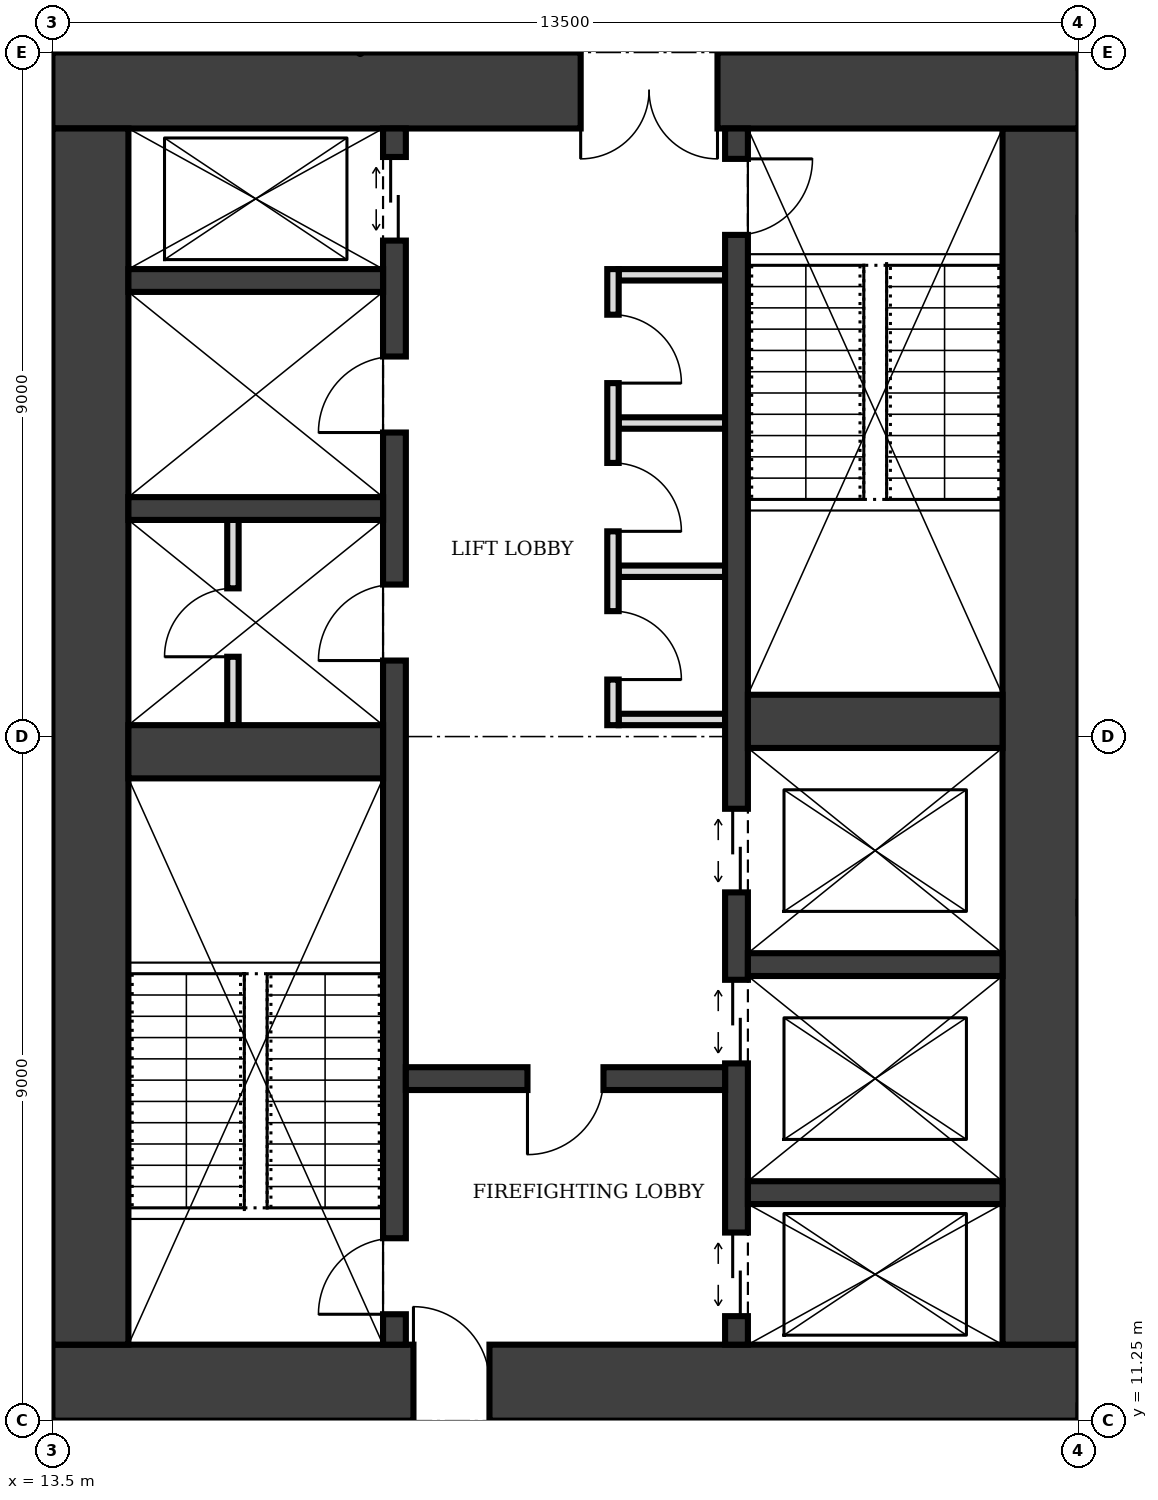
"""IFC4 building model, lengths in metres.
Left out: names, types, materials, properties, quantities, classifications, styles, units other than length and angle.
Written with IfcOpenShell. Run it as: python <this file> out.ifc"""

import sys

from ifc_helpers import new_model, si_unit, direction, frame, frame_2d, origin, place, context, subcontext, project, spatial, rectangle, extrude, element, fill, save


model = new_model("IFC4")
c1 = context("Model", 3, precision=1e-05, world=origin(), true_north=direction((0.0, 1.0)))
c2 = subcontext(c1, "Body", "Model", "MODEL_VIEW")
j1 = project(units=[si_unit("LENGTHUNIT", "METRE"), si_unit("PLANEANGLEUNIT", "RADIAN")], contexts=[c1])
p1 = place(None, origin())
s1 = spatial("IfcSite", under=j1, at=p1, CompositionType="ELEMENT")
p2 = place(p1, origin())
s2 = spatial("IfcBuilding", under=s1, at=p2, CompositionType="ELEMENT")
p3 = place(p2, frame((0.0, 0.0, 141.0)))
s3 = spatial("IfcBuildingStorey", under=s2, at=p3, CompositionType="ELEMENT", Elevation=141.0)
p4 = place(p3, frame((13.5, 11.75, 0.0), z_axis=(0.0, 0.0, 1.0), x_axis=(1.0, 0.0, 0.0)))
e1 = element("IfcWall", 1, at=p4, inside=s3, PredefinedType="SHEAR", context=c2, shape_type="SweptSolid", body=[
    extrude(rectangle(XDim=13.5, YDim=1.0, at=frame_2d((6.75, 0.0))), origin(), (0.0, 0.0, 1.0), 4.0),
])
p5 = place(p4, frame((4.75, 0.0, 0.0)))
e2 = element("IfcOpeningElement", 2, at=p5, cuts=e1, PredefinedType="OPENING", context=c2, shape_type="SweptSolid", body=[
    extrude(rectangle(XDim=1.0, YDim=2.1, at=frame_2d((0.5, 1.05))), frame((0.0, 0.51, 0.0), z_axis=(0.0, -1.0, 0.0), x_axis=(1.0, 0.0, 0.0)), (0.0, 0.0, 1.0), 1.02),
])
p6 = place(p3, frame((26.5, 12.25, 0.0), z_axis=(0.0, 0.0, 1.0), x_axis=(0.0, 1.0, 0.0)))
e3 = element("IfcWall", 3, at=p6, inside=s3, PredefinedType="SHEAR", context=c2, shape_type="SweptSolid", body=[
    extrude(rectangle(XDim=16.0, YDim=1.0, at=frame_2d((8.0, 0.0))), origin(), (0.0, 0.0, 1.0), 4.0),
])
p7 = place(p3, frame((27.0, 28.75, 0.0), z_axis=(0.0, 0.0, 1.0), x_axis=(-1.0, 0.0, 0.0)))
e4 = element("IfcWall", 4, at=p7, inside=s3, PredefinedType="SHEAR", context=c2, shape_type="SweptSolid", body=[
    extrude(rectangle(XDim=13.5, YDim=1.0, at=frame_2d((6.75, 0.0))), origin(), (0.0, 0.0, 1.0), 4.0),
])
p8 = place(p7, frame((4.75, 0.0, 0.0)))
e5 = element("IfcOpeningElement", 5, at=p8, cuts=e4, PredefinedType="OPENING", context=c2, shape_type="SweptSolid", body=[
    extrude(rectangle(XDim=1.8, YDim=2.1, at=frame_2d((0.9, 1.05))), frame((0.0, 0.51, 0.0), z_axis=(0.0, -1.0, 0.0), x_axis=(1.0, 0.0, 0.0)), (0.0, 0.0, 1.0), 1.02),
])
p9 = place(p3, frame((14.0, 28.25, 0.0), z_axis=(0.0, 0.0, 1.0), x_axis=(0.0, -1.0, 0.0)))
e6 = element("IfcWall", 6, at=p9, inside=s3, PredefinedType="SHEAR", context=c2, shape_type="SweptSolid", body=[
    extrude(rectangle(XDim=16.0, YDim=1.0, at=frame_2d((8.0, 0.0))), origin(), (0.0, 0.0, 1.0), 4.0),
])
p10 = place(p3, frame((18.0, 12.25, 0.0), z_axis=(0.0, 0.0, 1.0), x_axis=(0.0, 1.0, 0.0)))
e7 = element("IfcWall", 7, at=p10, inside=s3, PredefinedType="SHEAR", context=c2, shape_type="SweptSolid", body=[
    extrude(rectangle(XDim=16.0, YDim=0.3, at=frame_2d((8.0, 0.0))), origin(), (0.0, 0.0, 1.0), 4.0),
])
p11 = place(p10, frame((0.4, 0.0, 0.0)))
e8 = element("IfcOpeningElement", 8, at=p11, cuts=e7, PredefinedType="OPENING", context=c2, shape_type="SweptSolid", body=[
    extrude(rectangle(XDim=1.0, YDim=2.1, at=frame_2d((0.5, 1.05))), frame((0.0, 0.16, 0.0), z_axis=(0.0, -1.0, 0.0), x_axis=(1.0, 0.0, 0.0)), (0.0, 0.0, 1.0), 0.32),
])
p12 = place(p10, frame((14.525, 0.0, 0.0)))
e9 = element("IfcOpeningElement", 9, at=p12, cuts=e7, PredefinedType="OPENING", context=c2, shape_type="SweptSolid", body=[
    extrude(rectangle(XDim=1.1, YDim=2.1, at=frame_2d((0.55, 1.05))), frame((0.0, 0.16, 0.0), z_axis=(0.0, -1.0, 0.0), x_axis=(1.0, 0.0, 0.0)), (0.0, 0.0, 1.0), 0.32),
])
p13 = place(p10, frame((9.0, 0.0, 0.0)))
e10 = element("IfcOpeningElement", 10, at=p13, cuts=e7, PredefinedType="OPENING", context=c2, shape_type="SweptSolid", body=[
    extrude(rectangle(XDim=1.0, YDim=2.1, at=frame_2d((0.5, 1.05))), frame((0.0, 0.16, 0.0), z_axis=(0.0, -1.0, 0.0), x_axis=(1.0, 0.0, 0.0)), (0.0, 0.0, 1.0), 0.32),
])
p14 = place(p10, frame((12.0, 0.0, 0.0)))
e11 = element("IfcOpeningElement", 11, at=p14, cuts=e7, PredefinedType="OPENING", context=c2, shape_type="SweptSolid", body=[
    extrude(rectangle(XDim=1.0, YDim=2.1, at=frame_2d((0.5, 1.05))), frame((0.0, 0.16, 0.0), z_axis=(0.0, -1.0, 0.0), x_axis=(1.0, 0.0, 0.0)), (0.0, 0.0, 1.0), 0.32),
])
p15 = place(p3, frame((22.5, 12.25, 0.0), z_axis=(0.0, 0.0, 1.0), x_axis=(0.0, 1.0, 0.0)))
e12 = element("IfcWall", 12, at=p15, inside=s3, PredefinedType="SHEAR", context=c2, shape_type="SweptSolid", body=[
    extrude(rectangle(XDim=16.0, YDim=0.3, at=frame_2d((8.0, 0.0))), origin(), (0.0, 0.0, 1.0), 4.0),
])
p16 = place(p15, frame((14.6, 0.0, 0.0)))
e13 = element("IfcOpeningElement", 13, at=p16, cuts=e12, PredefinedType="OPENING", context=c2, shape_type="SweptSolid", body=[
    extrude(rectangle(XDim=1.0, YDim=2.1, at=frame_2d((0.5, 1.05))), frame((0.0, 0.16, 0.0), z_axis=(0.0, -1.0, 0.0), x_axis=(1.0, 0.0, 0.0)), (0.0, 0.0, 1.0), 0.32),
])
p17 = place(p15, frame((0.375, 0.0, 0.0)))
e14 = element("IfcOpeningElement", 14, at=p17, cuts=e12, PredefinedType="OPENING", context=c2, shape_type="SweptSolid", body=[
    extrude(rectangle(XDim=1.1, YDim=2.1, at=frame_2d((0.55, 1.05))), frame((0.0, 0.16, 0.0), z_axis=(0.0, -1.0, 0.0), x_axis=(1.0, 0.0, 0.0)), (0.0, 0.0, 1.0), 0.32),
])
p18 = place(p15, frame((3.7, 0.0, 0.0)))
e15 = element("IfcOpeningElement", 15, at=p18, cuts=e12, PredefinedType="OPENING", context=c2, shape_type="SweptSolid", body=[
    extrude(rectangle(XDim=1.1, YDim=2.1, at=frame_2d((0.55, 1.05))), frame((0.0, 0.16, 0.0), z_axis=(0.0, -1.0, 0.0), x_axis=(1.0, 0.0, 0.0)), (0.0, 0.0, 1.0), 0.32),
])
p19 = place(p15, frame((5.95, 0.0, 0.0)))
e16 = element("IfcOpeningElement", 16, at=p19, cuts=e12, PredefinedType="OPENING", context=c2, shape_type="SweptSolid", body=[
    extrude(rectangle(XDim=1.1, YDim=2.1, at=frame_2d((0.55, 1.05))), frame((0.0, 0.16, 0.0), z_axis=(0.0, -1.0, 0.0), x_axis=(1.0, 0.0, 0.0)), (0.0, 0.0, 1.0), 0.32),
])
p20 = place(p3, frame((14.5, 20.05, 0.0), z_axis=(0.0, 0.0, 1.0), x_axis=(1.0, 0.0, 0.0)))
e17 = element("IfcWall", 17, at=p20, inside=s3, PredefinedType="SHEAR", context=c2, shape_type="SweptSolid", body=[
    extrude(rectangle(XDim=3.35, YDim=0.7, at=frame_2d((1.675, 0.0))), origin(), (0.0, 0.0, 1.0), 4.0),
])
p21 = place(p3, frame((18.15, 15.75, 0.0), z_axis=(0.0, 0.0, 1.0), x_axis=(1.0, 0.0, 0.0)))
e18 = element("IfcWall", 18, at=p21, inside=s3, PredefinedType="SHEAR", context=c2, shape_type="SweptSolid", body=[
    extrude(rectangle(XDim=4.2, YDim=0.3, at=frame_2d((2.1, 0.0))), origin(), (0.0, 0.0, 1.0), 4.0),
])
p22 = place(p21, frame((1.6, 0.0, 0.0)))
e19 = element("IfcOpeningElement", 19, at=p22, cuts=e18, PredefinedType="OPENING", context=c2, shape_type="SweptSolid", body=[
    extrude(rectangle(XDim=1.0, YDim=2.1, at=frame_2d((0.5, 1.05))), frame((0.0, 0.16, 0.0), z_axis=(0.0, -1.0, 0.0), x_axis=(1.0, 0.0, 0.0)), (0.0, 0.0, 1.0), 0.32),
])
for number, where, z_axis, x_axis in (
    (20, (22.65, 14.25, 0.0), (0.0, 0.0, 1.0), (1.0, 0.0, 0.0)),
    (21, (22.65, 17.25, 0.0), (0.0, 0.0, 1.0), (1.0, 0.0, 0.0)),
):
    element("IfcWall", number, at=place(p3, frame(where, z_axis=z_axis, x_axis=x_axis)), inside=s3, PredefinedType="SHEAR", context=c2, shape_type="SweptSolid", body=[
        extrude(rectangle(XDim=3.35, YDim=0.3, at=frame_2d((1.675, 0.0))), origin(), (0.0, 0.0, 1.0), 4.0),
    ])
p23 = place(p3, frame((22.65, 20.45, 0.0), z_axis=(0.0, 0.0, 1.0), x_axis=(1.0, 0.0, 0.0)))
e22 = element("IfcWall", 22, at=p23, inside=s3, PredefinedType="SHEAR", context=c2, shape_type="SweptSolid", body=[
    extrude(rectangle(XDim=3.35, YDim=0.7, at=frame_2d((1.675, 0.0))), origin(), (0.0, 0.0, 1.0), 4.0),
])
for number, where, z_axis, x_axis in (
    (23, (14.5, 23.25, 0.0), (0.0, 0.0, 1.0), (1.0, 0.0, 0.0)),
    (24, (14.5, 26.25, 0.0), (0.0, 0.0, 1.0), (1.0, 0.0, 0.0)),
):
    element("IfcWall", number, at=place(p3, frame(where, z_axis=z_axis, x_axis=x_axis)), inside=s3, PredefinedType="SHEAR", context=c2, shape_type="SweptSolid", body=[
        extrude(rectangle(XDim=3.35, YDim=0.3, at=frame_2d((1.675, 0.0))), origin(), (0.0, 0.0, 1.0), 4.0),
    ])
p24 = place(p3, frame((20.875, 20.4, 0.0), z_axis=(0.0, 0.0, 1.0), x_axis=(0.0, 1.0, 0.0)))
e25 = element("IfcWall", 25, at=p24, inside=s3, PredefinedType="PARTITIONING", context=c2, shape_type="SweptSolid", body=[
    extrude(rectangle(XDim=6.0, YDim=0.15, at=frame_2d((3.0, 0.0))), origin(), (0.0, 0.0, 1.0), 3.75),
])
p25 = place(p24, frame((0.6, 0.0, 0.0)))
e26 = element("IfcOpeningElement", 26, at=p25, cuts=e25, PredefinedType="OPENING", context=c2, shape_type="SweptSolid", body=[
    extrude(rectangle(XDim=0.9, YDim=2.1, at=frame_2d((0.45, 1.05))), frame((0.0, 0.085, 0.0), z_axis=(0.0, -1.0, 0.0), x_axis=(1.0, 0.0, 0.0)), (0.0, 0.0, 1.0), 0.17),
])
p26 = place(p24, frame((2.55, 0.0, 0.0)))
e27 = element("IfcOpeningElement", 27, at=p26, cuts=e25, PredefinedType="OPENING", context=c2, shape_type="SweptSolid", body=[
    extrude(rectangle(XDim=0.9, YDim=2.1, at=frame_2d((0.45, 1.05))), frame((0.0, 0.085, 0.0), z_axis=(0.0, -1.0, 0.0), x_axis=(1.0, 0.0, 0.0)), (0.0, 0.0, 1.0), 0.17),
])
p27 = place(p24, frame((4.5, 0.0, 0.0)))
e28 = element("IfcOpeningElement", 28, at=p27, cuts=e25, PredefinedType="OPENING", context=c2, shape_type="SweptSolid", body=[
    extrude(rectangle(XDim=0.9, YDim=2.1, at=frame_2d((0.45, 1.05))), frame((0.0, 0.085, 0.0), z_axis=(0.0, -1.0, 0.0), x_axis=(1.0, 0.0, 0.0)), (0.0, 0.0, 1.0), 0.17),
])
for number, where, z_axis, x_axis in (
    (29, (20.95, 20.475, 0.0), (0.0, 0.0, 1.0), (1.0, 0.0, 0.0)),
    (30, (20.95, 22.425, 0.0), (0.0, 0.0, 1.0), (1.0, 0.0, 0.0)),
    (31, (20.95, 24.375, 0.0), (0.0, 0.0, 1.0), (1.0, 0.0, 0.0)),
    (32, (20.95, 26.325, 0.0), (0.0, 0.0, 1.0), (1.0, 0.0, 0.0)),
):
    element("IfcWall", number, at=place(p3, frame(where, z_axis=z_axis, x_axis=x_axis)), inside=s3, PredefinedType="PARTITIONING", context=c2, shape_type="SweptSolid", body=[
        extrude(rectangle(XDim=1.4, YDim=0.15, at=frame_2d((0.7, 0.0))), origin(), (0.0, 0.0, 1.0), 3.75),
    ])
p28 = place(p3, frame((15.875, 20.4, 0.0), z_axis=(0.0, 0.0, 1.0), x_axis=(0.0, 1.0, 0.0)))
e33 = element("IfcWall", 33, at=p28, inside=s3, PredefinedType="PARTITIONING", context=c2, shape_type="SweptSolid", body=[
    extrude(rectangle(XDim=2.7, YDim=0.15, at=frame_2d((1.35, 0.0))), origin(), (0.0, 0.0, 1.0), 3.75),
])
p29 = place(p28, frame((0.9, 0.0, 0.0)))
e34 = element("IfcOpeningElement", 34, at=p29, cuts=e33, PredefinedType="OPENING", context=c2, shape_type="SweptSolid", body=[
    extrude(rectangle(XDim=0.9, YDim=2.1, at=frame_2d((0.45, 1.05))), frame((0.0, 0.085, 0.0), z_axis=(0.0, -1.0, 0.0), x_axis=(1.0, 0.0, 0.0)), (0.0, 0.0, 1.0), 0.17),
])
for number, where, z_axis, x_axis in (
    (35, (27.0, 11.35, 0.0), (0.0, 0.0, 1.0), (1.0, 0.0, 0.0)),
    (36, (27.0, 29.15, 0.0), (0.0, 0.0, 1.0), (1.0, 0.0, 0.0)),
):
    element("IfcWall", number, at=place(p3, frame(where, z_axis=z_axis, x_axis=x_axis)), inside=s3, PredefinedType="SOLIDWALL", context=c2, shape_type="SweptSolid", body=[
        extrude(rectangle(XDim=7.93, YDim=0.2, at=frame_2d((3.965, 0.0))), origin(), (0.0, 0.0, 1.0), 2.85),
    ])
p30 = place(p5, origin())
e37 = element("IfcDoor", 37, at=p30, inside=s3, OperationType="SINGLE_SWING_LEFT", PredefinedType="DOOR", context=c2, shape_type="SweptSolid", body=[
    extrude(rectangle(XDim=1.0, YDim=2.1, at=frame_2d((0.5, 1.05))), frame((0.0, 0.025, 0.0), z_axis=(0.0, -1.0, 0.0), x_axis=(1.0, 0.0, 0.0)), (0.0, 0.0, 1.0), 0.05),
])
fill(e2, e37)
p31 = place(p8, origin())
e38 = element("IfcDoor", 38, at=p31, inside=s3, OperationType="DOUBLE_DOOR_SINGLE_SWING", PredefinedType="DOOR", context=c2, shape_type="SweptSolid", body=[
    extrude(rectangle(XDim=1.8, YDim=2.1, at=frame_2d((0.9, 1.05))), frame((0.0, 0.025, 0.0), z_axis=(0.0, -1.0, 0.0), x_axis=(1.0, 0.0, 0.0)), (0.0, 0.0, 1.0), 0.05),
])
fill(e5, e38)
p32 = place(p22, frame((1.0, 0.0, 0.0), z_axis=(0.0, 0.0, 1.0), x_axis=(-1.0, 0.0, 0.0)))
e39 = element("IfcDoor", 39, at=p32, inside=s3, OperationType="SINGLE_SWING_RIGHT", PredefinedType="DOOR", context=c2, shape_type="SweptSolid", body=[
    extrude(rectangle(XDim=1.0, YDim=2.1, at=frame_2d((0.5, 1.05))), frame((0.0, 0.025, 0.0), z_axis=(0.0, -1.0, 0.0), x_axis=(1.0, 0.0, 0.0)), (0.0, 0.0, 1.0), 0.05),
])
fill(e19, e39)
p33 = place(p11, origin())
e40 = element("IfcDoor", 40, at=p33, inside=s3, OperationType="SINGLE_SWING_LEFT", PredefinedType="DOOR", context=c2, shape_type="SweptSolid", body=[
    extrude(rectangle(XDim=1.0, YDim=2.1, at=frame_2d((0.5, 1.05))), frame((0.0, 0.025, 0.0), z_axis=(0.0, -1.0, 0.0), x_axis=(1.0, 0.0, 0.0)), (0.0, 0.0, 1.0), 0.05),
])
fill(e8, e40)
p34 = place(p16, frame((1.0, 0.0, 0.0), z_axis=(0.0, 0.0, 1.0), x_axis=(-1.0, 0.0, 0.0)))
e41 = element("IfcDoor", 41, at=p34, inside=s3, OperationType="SINGLE_SWING_LEFT", PredefinedType="DOOR", context=c2, shape_type="SweptSolid", body=[
    extrude(rectangle(XDim=1.0, YDim=2.1, at=frame_2d((0.5, 1.05))), frame((0.0, 0.025, 0.0), z_axis=(0.0, -1.0, 0.0), x_axis=(1.0, 0.0, 0.0)), (0.0, 0.0, 1.0), 0.05),
])
fill(e13, e41)
p35 = place(p17, origin())
e42 = element("IfcDoor", 42, at=p35, inside=s3, OperationType="DOUBLE_DOOR_SLIDING", PredefinedType="DOOR", context=c2, shape_type="SweptSolid", body=[
    extrude(rectangle(XDim=1.1, YDim=2.1, at=frame_2d((0.55, 1.05))), frame((0.0, 0.025, 0.0), z_axis=(0.0, -1.0, 0.0), x_axis=(1.0, 0.0, 0.0)), (0.0, 0.0, 1.0), 0.05),
])
fill(e14, e42)
p36 = place(p12, origin())
e43 = element("IfcDoor", 43, at=p36, inside=s3, OperationType="DOUBLE_DOOR_SLIDING", PredefinedType="DOOR", context=c2, shape_type="SweptSolid", body=[
    extrude(rectangle(XDim=1.1, YDim=2.1, at=frame_2d((0.55, 1.05))), frame((0.0, 0.025, 0.0), z_axis=(0.0, -1.0, 0.0), x_axis=(1.0, 0.0, 0.0)), (0.0, 0.0, 1.0), 0.05),
])
fill(e9, e43)
p37 = place(p18, origin())
e44 = element("IfcDoor", 44, at=p37, inside=s3, OperationType="DOUBLE_DOOR_SLIDING", PredefinedType="DOOR", context=c2, shape_type="SweptSolid", body=[
    extrude(rectangle(XDim=1.1, YDim=2.1, at=frame_2d((0.55, 1.05))), frame((0.0, 0.025, 0.0), z_axis=(0.0, -1.0, 0.0), x_axis=(1.0, 0.0, 0.0)), (0.0, 0.0, 1.0), 0.05),
])
fill(e15, e44)
p38 = place(p19, origin())
e45 = element("IfcDoor", 45, at=p38, inside=s3, OperationType="DOUBLE_DOOR_SLIDING", PredefinedType="DOOR", context=c2, shape_type="SweptSolid", body=[
    extrude(rectangle(XDim=1.1, YDim=2.1, at=frame_2d((0.55, 1.05))), frame((0.0, 0.025, 0.0), z_axis=(0.0, -1.0, 0.0), x_axis=(1.0, 0.0, 0.0)), (0.0, 0.0, 1.0), 0.05),
])
fill(e16, e45)
p39 = place(p25, frame((0.9, 0.0, 0.0), z_axis=(0.0, 0.0, 1.0), x_axis=(-1.0, 0.0, 0.0)))
e46 = element("IfcDoor", 46, at=p39, inside=s3, OperationType="SINGLE_SWING_RIGHT", PredefinedType="DOOR", context=c2, shape_type="SweptSolid", body=[
    extrude(rectangle(XDim=0.9, YDim=2.1, at=frame_2d((0.45, 1.05))), frame((0.0, 0.025, 0.0), z_axis=(0.0, -1.0, 0.0), x_axis=(1.0, 0.0, 0.0)), (0.0, 0.0, 1.0), 0.05),
])
fill(e26, e46)
p40 = place(p26, frame((0.9, 0.0, 0.0), z_axis=(0.0, 0.0, 1.0), x_axis=(-1.0, 0.0, 0.0)))
e47 = element("IfcDoor", 47, at=p40, inside=s3, OperationType="SINGLE_SWING_RIGHT", PredefinedType="DOOR", context=c2, shape_type="SweptSolid", body=[
    extrude(rectangle(XDim=0.9, YDim=2.1, at=frame_2d((0.45, 1.05))), frame((0.0, 0.025, 0.0), z_axis=(0.0, -1.0, 0.0), x_axis=(1.0, 0.0, 0.0)), (0.0, 0.0, 1.0), 0.05),
])
fill(e27, e47)
p41 = place(p27, frame((0.9, 0.0, 0.0), z_axis=(0.0, 0.0, 1.0), x_axis=(-1.0, 0.0, 0.0)))
e48 = element("IfcDoor", 48, at=p41, inside=s3, OperationType="SINGLE_SWING_RIGHT", PredefinedType="DOOR", context=c2, shape_type="SweptSolid", body=[
    extrude(rectangle(XDim=0.9, YDim=2.1, at=frame_2d((0.45, 1.05))), frame((0.0, 0.025, 0.0), z_axis=(0.0, -1.0, 0.0), x_axis=(1.0, 0.0, 0.0)), (0.0, 0.0, 1.0), 0.05),
])
fill(e28, e48)
p42 = place(p13, origin())
e49 = element("IfcDoor", 49, at=p42, inside=s3, OperationType="SINGLE_SWING_LEFT", PredefinedType="DOOR", context=c2, shape_type="SweptSolid", body=[
    extrude(rectangle(XDim=1.0, YDim=2.1, at=frame_2d((0.5, 1.05))), frame((0.0, 0.025, 0.0), z_axis=(0.0, -1.0, 0.0), x_axis=(1.0, 0.0, 0.0)), (0.0, 0.0, 1.0), 0.05),
])
fill(e10, e49)
p43 = place(p29, origin())
e50 = element("IfcDoor", 50, at=p43, inside=s3, OperationType="SINGLE_SWING_LEFT", PredefinedType="DOOR", context=c2, shape_type="SweptSolid", body=[
    extrude(rectangle(XDim=0.9, YDim=2.1, at=frame_2d((0.45, 1.05))), frame((0.0, 0.025, 0.0), z_axis=(0.0, -1.0, 0.0), x_axis=(1.0, 0.0, 0.0)), (0.0, 0.0, 1.0), 0.05),
])
fill(e34, e50)
p44 = place(p14, origin())
e51 = element("IfcDoor", 51, at=p44, inside=s3, OperationType="SINGLE_SWING_LEFT", PredefinedType="DOOR", context=c2, shape_type="SweptSolid", body=[
    extrude(rectangle(XDim=1.0, YDim=2.1, at=frame_2d((0.5, 1.05))), frame((0.0, 0.025, 0.0), z_axis=(0.0, -1.0, 0.0), x_axis=(1.0, 0.0, 0.0)), (0.0, 0.0, 1.0), 0.05),
])
fill(e11, e51)
save(model, sys.argv[1])
